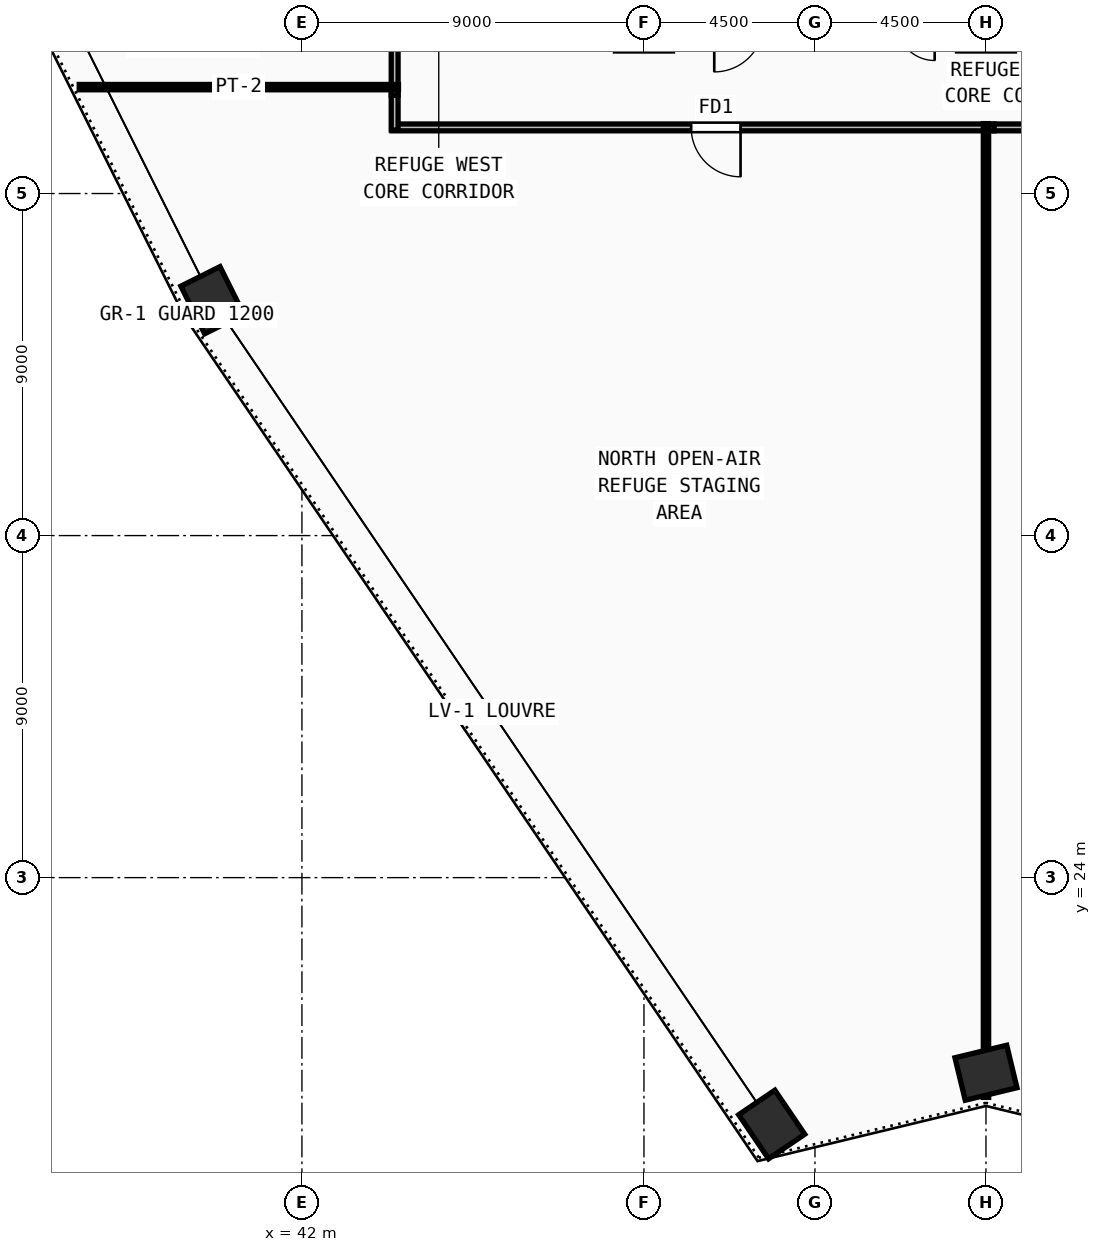
"""IFC4 building model, lengths in metres.
Left out: names, types, materials, properties, quantities, classifications, styles, units other than length and angle.
Written with IfcOpenShell. Run it as: python <this file> out.ifc"""

import sys

from ifc_helpers import new_model, si_unit, direction, frame, frame_2d, origin, origin_2d, place, context, subcontext, project, spatial, rectangle, extrude, source, transform, mapped, element, fill, save


model = new_model("IFC4")
c1 = context("Model", 3, precision=1e-05, world=origin(), true_north=direction((0.0, 1.0)))
c2 = subcontext(c1, "Body", "Model", "MODEL_VIEW")
j1 = project(units=[si_unit("LENGTHUNIT", "METRE"), si_unit("PLANEANGLEUNIT", "RADIAN")], contexts=[c1])
p1 = place(None, origin())
s1 = spatial("IfcSite", under=j1, at=p1, CompositionType="ELEMENT")
p2 = place(p1, origin())
s2 = spatial("IfcBuilding", under=s1, at=p2, CompositionType="ELEMENT")
p3 = place(p2, frame((0.0, 0.0, 185.25)))
s3 = spatial("IfcBuildingStorey", under=s2, at=p3, CompositionType="ELEMENT", Elevation=185.25)
m1 = source(origin(), c2, "Body", "SweptSolid", [
    extrude(rectangle(XDim=1.4, YDim=1.15, at=origin_2d()), origin(), (0.0, 0.0, 1.0), 4.5),
])
for number, where, z_axis, x_axis in (
    (1, (54.362, 17.504, 0.0), (0.0, 0.0, 1.0), (-0.562, 0.827, 0.0)),
    (2, (39.642, 39.193, 0.0), (0.0, 0.0, 1.0), (-0.447, 0.895, 0.0)),
    (3, (60.0, 18.866, 0.0), (0.0, 0.0, 1.0), (0.972, 0.235, 0.0)),
):
    element("IfcColumn", number, at=place(p3, frame(where, z_axis=z_axis, x_axis=x_axis)), inside=s3, PredefinedType="COLUMN", context=c2, shape_type="MappedRepresentation", body=[
        mapped(m1, transform((0.0, 0.0, 0.0), x_axis=(1.0, 0.0, 0.0), y_axis=(0.0, 1.0, 0.0), z_axis=(0.0, 0.0, 1.0), scale=1.0)),
    ])
p4 = place(p3, frame((60.215, 43.74, 0.0), z_axis=(0.0, 0.0, 1.0), x_axis=(-1.0, 0.0, 0.0)))
e4 = element("IfcWall", 4, at=p4, inside=s3, PredefinedType="PARTITIONING", context=c2, shape_type="SweptSolid", body=[
    extrude(rectangle(XDim=15.845, YDim=0.18, at=frame_2d((7.922, 0.0))), origin(), (0.0, 0.0, 1.0), 4.22),
])
m2 = source(origin(), c2, "Body", "SweptSolid", [
    extrude(rectangle(XDim=1.3, YDim=2.2, at=frame_2d((0.65, 1.1))), frame((0.0, 0.1, 0.0), z_axis=(0.0, -1.0, 0.0), x_axis=(1.0, 0.0, 0.0)), (0.0, 0.0, 1.0), 0.2),
])
p5 = place(p4, frame((6.673, 0.0, 0.0)))
e5 = element("IfcOpeningElement", 5, at=p5, cuts=e4, PredefinedType="OPENING", context=c2, shape_type="MappedRepresentation", body=[
    mapped(m2, transform((0.0, 0.0, 0.0), x_axis=(1.0, 0.0, 0.0), y_axis=(0.0, 1.0, 0.0), z_axis=(0.0, 0.0, 1.0), scale=1.0)),
])
p6 = place(p3, frame((75.63, 43.74, 0.0), z_axis=(0.0, 0.0, 1.0), x_axis=(-1.0, 0.0, 0.0)))
e6 = element("IfcWall", 6, at=p6, inside=s3, PredefinedType="PARTITIONING", context=c2, shape_type="SweptSolid", body=[
    extrude(rectangle(XDim=15.415, YDim=0.18, at=frame_2d((7.708, 0.0))), origin(), (0.0, 0.0, 1.0), 4.22),
])
m3 = source(origin(), c2, "Body", "SweptSolid", [
    extrude(rectangle(XDim=1.4, YDim=2.25, at=frame_2d((0.7, 1.125))), frame((0.0, 0.1, 0.0), z_axis=(0.0, -1.0, 0.0), x_axis=(1.0, 0.0, 0.0)), (0.0, 0.0, 1.0), 0.2),
])
p7 = place(p6, frame((7.907, 0.0, 0.0)))
e7 = element("IfcOpeningElement", 7, at=p7, cuts=e6, PredefinedType="OPENING", context=c2, shape_type="MappedRepresentation", body=[
    mapped(m3, transform((0.0, 0.0, 0.0), x_axis=(1.0, 0.0, 0.0), y_axis=(0.0, 1.0, 0.0), z_axis=(0.0, 0.0, 1.0), scale=1.0)),
])
p8 = place(p3, frame((44.44, 44.585, 0.0), z_axis=(0.0, 0.0, 1.0), x_axis=(0.0, 1.0, 0.0)))
e8 = element("IfcWall", 8, at=p8, inside=s3, PredefinedType="PARTITIONING", context=c2, shape_type="SweptSolid", body=[
    extrude(rectangle(XDim=2.755, YDim=0.18, at=frame_2d((1.377, 0.0))), origin(), (0.0, 0.0, 1.0), 4.22),
])
p9 = place(p3, frame((44.44, 43.67, 0.0), z_axis=(0.0, 0.0, 1.0), x_axis=(0.0, 1.0, 0.0)))
e9 = element("IfcWall", 9, at=p9, inside=s3, PredefinedType="PARTITIONING", context=c2, shape_type="SweptSolid", body=[
    extrude(rectangle(XDim=0.915, YDim=0.18, at=frame_2d((0.458, 0.0))), origin(), (0.0, 0.0, 1.0), 4.22),
])
p10 = place(p3, frame((44.54, 44.8, 0.0), z_axis=(0.0, 0.0, 1.0), x_axis=(-1.0, 0.0, 0.0)))
e10 = element("IfcWall", 10, at=p10, inside=s3, PredefinedType="PARTITIONING", context=c2, shape_type="SweptSolid", body=[
    extrude(rectangle(XDim=8.4, YDim=0.14, at=frame_2d((4.2, 0.0))), origin(), (0.0, 0.0, 1.0), 2.26),
])
p11 = place(p3, frame((60.0, 43.84, 0.0), z_axis=(0.0, 0.0, 1.0), x_axis=(0.0, -1.0, 0.0)))
e11 = element("IfcWall", 11, at=p11, inside=s3, PredefinedType="PARTITIONING", context=c2, shape_type="SweptSolid", body=[
    extrude(rectangle(XDim=25.622, YDim=0.14, at=frame_2d((12.811, 0.0))), origin(), (0.0, 0.0, 1.0), 4.22),
])
m4 = source(origin(), c2, "Body", "SweptSolid", [
    extrude(rectangle(XDim=1.3, YDim=2.2, at=frame_2d((0.65, 1.1))), frame((0.0, 0.025, 0.0), z_axis=(0.0, -1.0, 0.0), x_axis=(1.0, 0.0, 0.0)), (0.0, 0.0, 1.0), 0.05),
])
p12 = place(p5, origin())
e12 = element("IfcDoor", 12, at=p12, inside=s3, OperationType="SINGLE_SWING_LEFT", PredefinedType="DOOR", context=c2, shape_type="MappedRepresentation", body=[
    mapped(m4, transform((0.0, 0.0, 0.0), x_axis=(1.0, 0.0, 0.0), y_axis=(0.0, 1.0, 0.0), z_axis=(0.0, 0.0, 1.0), scale=1.0)),
])
fill(e5, e12)
save(model, sys.argv[1])
